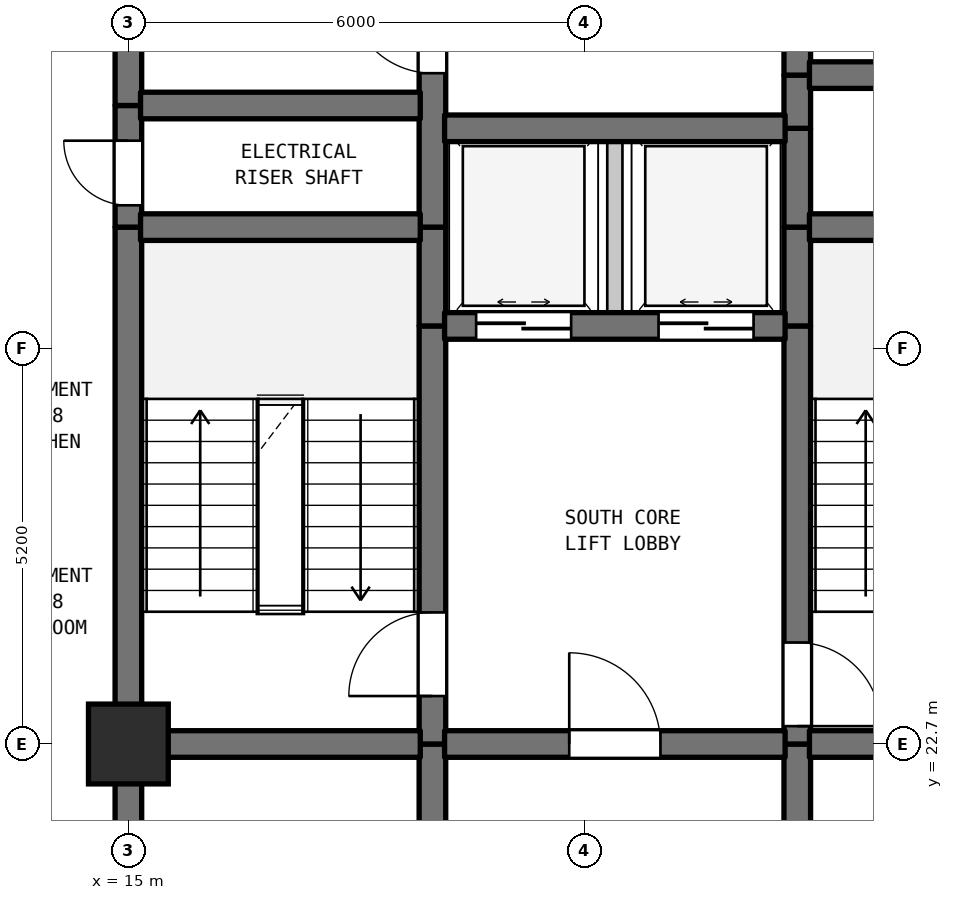
"""IFC4 building model, lengths in metres.
Left out: names, types, materials, properties, quantities, classifications, styles, units other than length and angle.
Written with IfcOpenShell. Run it as: python <this file> out.ifc"""

import sys

from ifc_helpers import new_model, si_unit, direction, frame, frame_2d, origin, origin_2d, place, context, subcontext, project, spatial, rectangle, extrude, element, fill, save


model = new_model("IFC4")
c1 = context("Model", 3, precision=1e-05, world=origin(), true_north=direction((0.0, 1.0)))
c2 = subcontext(c1, "Body", "Model", "MODEL_VIEW")
j1 = project(units=[si_unit("LENGTHUNIT", "METRE"), si_unit("PLANEANGLEUNIT", "RADIAN")], contexts=[c1])
p1 = place(None, origin())
s1 = spatial("IfcSite", under=j1, at=p1, CompositionType="ELEMENT")
p2 = place(p1, origin())
s2 = spatial("IfcBuilding", under=s1, at=p2, CompositionType="ELEMENT")
p3 = place(p2, frame((0.0, 0.0, 109.4)))
s3 = spatial("IfcBuildingStorey", under=s2, at=p3, CompositionType="ELEMENT", Elevation=109.4)
p4 = place(p3, frame((15.0, 22.7, 0.0), z_axis=(0.0, 0.0, 1.0), x_axis=(1.0, 0.0, 0.0)))
e1 = element("IfcColumn", 1, at=p4, inside=s3, PredefinedType="COLUMN", context=c2, shape_type="SweptSolid", body=[
    extrude(rectangle(XDim=1.05, YDim=1.05, at=origin_2d()), origin(), (0.0, 0.0, 1.0), 3.7),
])
p5 = place(p3, frame((15.0, 19.5, 0.0), z_axis=(0.0, 0.0, 1.0), x_axis=(0.0, 1.0, 0.0)))
e2 = element("IfcWall", 2, at=p5, inside=s3, PredefinedType="SHEAR", context=c2, shape_type="SweptSolid", body=[
    extrude(rectangle(XDim=3.2, YDim=0.35, at=frame_2d((1.6, 0.0))), origin(), (0.0, 0.0, 1.0), 3.385),
])
p6 = place(p3, frame((15.0, 22.7, 0.0), z_axis=(0.0, 0.0, 1.0), x_axis=(0.0, 1.0, 0.0)))
e3 = element("IfcWall", 3, at=p6, inside=s3, PredefinedType="SHEAR", context=c2, shape_type="SweptSolid", body=[
    extrude(rectangle(XDim=6.8, YDim=0.35, at=frame_2d((3.4, 0.0))), origin(), (0.0, 0.0, 1.0), 3.385),
])
p7 = place(p3, frame((15.0, 29.5, 0.0), z_axis=(0.0, 0.0, 1.0), x_axis=(0.0, 1.0, 0.0)))
e4 = element("IfcWall", 4, at=p7, inside=s3, PredefinedType="SHEAR", context=c2, shape_type="SweptSolid", body=[
    extrude(rectangle(XDim=1.6, YDim=0.35, at=frame_2d((0.8, 0.0))), origin(), (0.0, 0.0, 1.0), 3.385),
])
p8 = place(p7, frame((0.287, 0.0, 0.0)))
e5 = element("IfcOpeningElement", 5, at=p8, cuts=e4, PredefinedType="OPENING", context=c2, shape_type="SweptSolid", body=[
    extrude(rectangle(XDim=0.85, YDim=2.1, at=frame_2d((0.425, 1.05))), frame((0.0, 0.185, 0.0), z_axis=(0.0, -1.0, 0.0), x_axis=(1.0, 0.0, 0.0)), (0.0, 0.0, 1.0), 0.37),
])
p9 = place(p3, frame((15.0, 31.1, 0.0), z_axis=(0.0, 0.0, 1.0), x_axis=(0.0, 1.0, 0.0)))
e6 = element("IfcWall", 6, at=p9, inside=s3, PredefinedType="SHEAR", context=c2, shape_type="SweptSolid", body=[
    extrude(rectangle(XDim=6.8, YDim=0.35, at=frame_2d((3.4, 0.0))), origin(), (0.0, 0.0, 1.0), 3.385),
])
p10 = place(p3, frame((19.0, 19.5, 0.0), z_axis=(0.0, 0.0, 1.0), x_axis=(0.0, 1.0, 0.0)))
e7 = element("IfcWall", 7, at=p10, inside=s3, PredefinedType="SHEAR", context=c2, shape_type="SweptSolid", body=[
    extrude(rectangle(XDim=3.2, YDim=0.35, at=frame_2d((1.6, 0.0))), origin(), (0.0, 0.0, 1.0), 3.385),
])
p11 = place(p3, frame((19.0, 22.7, 0.0), z_axis=(0.0, 0.0, 1.0), x_axis=(0.0, 1.0, 0.0)))
e8 = element("IfcWall", 8, at=p11, inside=s3, PredefinedType="SHEAR", context=c2, shape_type="SweptSolid", body=[
    extrude(rectangle(XDim=5.5, YDim=0.35, at=frame_2d((2.75, 0.0))), origin(), (0.0, 0.0, 1.0), 3.385),
])
p12 = place(p11, frame((0.631, 0.0, 0.0)))
e9 = element("IfcOpeningElement", 9, at=p12, cuts=e8, PredefinedType="OPENING", context=c2, shape_type="SweptSolid", body=[
    extrude(rectangle(XDim=1.1, YDim=2.15, at=frame_2d((0.55, 1.075))), frame((0.0, 0.185, 0.0), z_axis=(0.0, -1.0, 0.0), x_axis=(1.0, 0.0, 0.0)), (0.0, 0.0, 1.0), 0.37),
])
p13 = place(p3, frame((19.0, 28.2, 0.0), z_axis=(0.0, 0.0, 1.0), x_axis=(0.0, 1.0, 0.0)))
e10 = element("IfcWall", 10, at=p13, inside=s3, PredefinedType="SHEAR", context=c2, shape_type="SweptSolid", body=[
    extrude(rectangle(XDim=1.3, YDim=0.35, at=frame_2d((0.65, 0.0))), origin(), (0.0, 0.0, 1.0), 3.385),
])
p14 = place(p3, frame((19.0, 29.5, 0.0), z_axis=(0.0, 0.0, 1.0), x_axis=(0.0, 1.0, 0.0)))
e11 = element("IfcWall", 11, at=p14, inside=s3, PredefinedType="SHEAR", context=c2, shape_type="SweptSolid", body=[
    extrude(rectangle(XDim=5.5, YDim=0.35, at=frame_2d((2.75, 0.0))), origin(), (0.0, 0.0, 1.0), 3.385),
])
p15 = place(p14, frame((2.025, 0.0, 0.0)))
e12 = element("IfcOpeningElement", 12, at=p15, cuts=e11, PredefinedType="OPENING", context=c2, shape_type="SweptSolid", body=[
    extrude(rectangle(XDim=1.1, YDim=2.15, at=frame_2d((0.55, 1.075))), frame((0.0, 0.185, 0.0), z_axis=(0.0, -1.0, 0.0), x_axis=(1.0, 0.0, 0.0)), (0.0, 0.0, 1.0), 0.37),
])
p16 = place(p3, frame((21.4, 28.2, 0.0), z_axis=(0.0, 0.0, 1.0), x_axis=(0.0, 1.0, 0.0)))
e13 = element("IfcWall", 13, at=p16, inside=s3, PredefinedType="STANDARD", context=c2, shape_type="SweptSolid", body=[
    extrude(rectangle(XDim=2.6, YDim=0.2, at=frame_2d((1.3, 0.0))), origin(), (0.0, 0.0, 1.0), 3.385),
])
p17 = place(p3, frame((23.8, 19.5, 0.0), z_axis=(0.0, 0.0, 1.0), x_axis=(0.0, 1.0, 0.0)))
e14 = element("IfcWall", 14, at=p17, inside=s3, PredefinedType="SHEAR", context=c2, shape_type="SweptSolid", body=[
    extrude(rectangle(XDim=3.2, YDim=0.35, at=frame_2d((1.6, 0.0))), origin(), (0.0, 0.0, 1.0), 3.385),
])
p18 = place(p3, frame((23.8, 22.7, 0.0), z_axis=(0.0, 0.0, 1.0), x_axis=(0.0, 1.0, 0.0)))
e15 = element("IfcWall", 15, at=p18, inside=s3, PredefinedType="SHEAR", context=c2, shape_type="SweptSolid", body=[
    extrude(rectangle(XDim=5.5, YDim=0.35, at=frame_2d((2.75, 0.0))), origin(), (0.0, 0.0, 1.0), 3.385),
])
p19 = place(p18, frame((0.235, 0.0, 0.0)))
e16 = element("IfcOpeningElement", 16, at=p19, cuts=e15, PredefinedType="OPENING", context=c2, shape_type="SweptSolid", body=[
    extrude(rectangle(XDim=1.1, YDim=2.15, at=frame_2d((0.55, 1.075))), frame((0.0, 0.185, 0.0), z_axis=(0.0, -1.0, 0.0), x_axis=(1.0, 0.0, 0.0)), (0.0, 0.0, 1.0), 0.37),
])
for number, where, z_axis, x_axis in (
    (17, (23.8, 28.2, 0.0), (0.0, 0.0, 1.0), (0.0, 1.0, 0.0)),
    (18, (23.8, 29.5, 0.0), (0.0, 0.0, 1.0), (0.0, 1.0, 0.0)),
):
    element("IfcWall", number, at=place(p3, frame(where, z_axis=z_axis, x_axis=x_axis)), inside=s3, PredefinedType="SHEAR", context=c2, shape_type="SweptSolid", body=[
        extrude(rectangle(XDim=1.3, YDim=0.35, at=frame_2d((0.65, 0.0))), origin(), (0.0, 0.0, 1.0), 3.385),
    ])
p20 = place(p3, frame((23.8, 30.8, 0.0), z_axis=(0.0, 0.0, 1.0), x_axis=(0.0, 1.0, 0.0)))
e19 = element("IfcWall", 19, at=p20, inside=s3, PredefinedType="SHEAR", context=c2, shape_type="SweptSolid", body=[
    extrude(rectangle(XDim=0.7, YDim=0.35, at=frame_2d((0.35, 0.0))), origin(), (0.0, 0.0, 1.0), 3.385),
])
p21 = place(p3, frame((23.8, 31.5, 0.0), z_axis=(0.0, 0.0, 1.0), x_axis=(0.0, 1.0, 0.0)))
e20 = element("IfcWall", 20, at=p21, inside=s3, PredefinedType="SHEAR", context=c2, shape_type="SweptSolid", body=[
    extrude(rectangle(XDim=3.5, YDim=0.35, at=frame_2d((1.75, 0.0))), origin(), (0.0, 0.0, 1.0), 3.385),
])
p22 = place(p21, frame((1.127, 0.0, 0.0)))
e21 = element("IfcOpeningElement", 21, at=p22, cuts=e20, PredefinedType="OPENING", context=c2, shape_type="SweptSolid", body=[
    extrude(rectangle(XDim=1.1, YDim=2.15, at=frame_2d((0.55, 1.075))), frame((0.0, 0.185, 0.0), z_axis=(0.0, -1.0, 0.0), x_axis=(1.0, 0.0, 0.0)), (0.0, 0.0, 1.0), 0.37),
])
p23 = place(p3, frame((15.16, 22.7, 0.0), z_axis=(0.0, 0.0, 1.0), x_axis=(1.0, 0.0, 0.0)))
e22 = element("IfcWall", 22, at=p23, inside=s3, PredefinedType="SHEAR", context=c2, shape_type="SweptSolid", body=[
    extrude(rectangle(XDim=3.68, YDim=0.35, at=frame_2d((1.84, 0.0))), origin(), (0.0, 0.0, 1.0), 3.385),
])
p24 = place(p3, frame((19.16, 22.7, 0.0), z_axis=(0.0, 0.0, 1.0), x_axis=(1.0, 0.0, 0.0)))
e23 = element("IfcWall", 23, at=p24, inside=s3, PredefinedType="SHEAR", context=c2, shape_type="SweptSolid", body=[
    extrude(rectangle(XDim=4.48, YDim=0.35, at=frame_2d((2.24, 0.0))), origin(), (0.0, 0.0, 1.0), 3.385),
])
p25 = place(p24, frame((1.64, 0.0, 0.0)))
e24 = element("IfcOpeningElement", 24, at=p25, cuts=e23, PredefinedType="OPENING", context=c2, shape_type="SweptSolid", body=[
    extrude(rectangle(XDim=1.2, YDim=2.2, at=frame_2d((0.6, 1.1))), frame((0.0, 0.185, 0.0), z_axis=(0.0, -1.0, 0.0), x_axis=(1.0, 0.0, 0.0)), (0.0, 0.0, 1.0), 0.37),
])
p26 = place(p3, frame((23.96, 22.7, 0.0), z_axis=(0.0, 0.0, 1.0), x_axis=(1.0, 0.0, 0.0)))
e25 = element("IfcWall", 25, at=p26, inside=s3, PredefinedType="SHEAR", context=c2, shape_type="SweptSolid", body=[
    extrude(rectangle(XDim=3.18, YDim=0.35, at=frame_2d((1.59, 0.0))), origin(), (0.0, 0.0, 1.0), 3.385),
])
p27 = place(p3, frame((19.16, 28.2, 0.0), z_axis=(0.0, 0.0, 1.0), x_axis=(1.0, 0.0, 0.0)))
e26 = element("IfcWall", 26, at=p27, inside=s3, PredefinedType="SHEAR", context=c2, shape_type="SweptSolid", body=[
    extrude(rectangle(XDim=4.48, YDim=0.35, at=frame_2d((2.24, 0.0))), origin(), (0.0, 0.0, 1.0), 3.385),
])
p28 = place(p27, frame((0.415, 0.0, 0.0)))
e27 = element("IfcOpeningElement", 27, at=p28, cuts=e26, PredefinedType="OPENING", context=c2, shape_type="SweptSolid", body=[
    extrude(rectangle(XDim=1.25, YDim=2.2, at=frame_2d((0.625, 1.1))), frame((0.0, 0.185, 0.0), z_axis=(0.0, -1.0, 0.0), x_axis=(1.0, 0.0, 0.0)), (0.0, 0.0, 1.0), 0.37),
])
p29 = place(p27, frame((2.815, 0.0, 0.0)))
e28 = element("IfcOpeningElement", 28, at=p29, cuts=e26, PredefinedType="OPENING", context=c2, shape_type="SweptSolid", body=[
    extrude(rectangle(XDim=1.25, YDim=2.2, at=frame_2d((0.625, 1.1))), frame((0.0, 0.185, 0.0), z_axis=(0.0, -1.0, 0.0), x_axis=(1.0, 0.0, 0.0)), (0.0, 0.0, 1.0), 0.37),
])
p30 = place(p3, frame((15.16, 29.5, 0.0), z_axis=(0.0, 0.0, 1.0), x_axis=(1.0, 0.0, 0.0)))
e29 = element("IfcWall", 29, at=p30, inside=s3, PredefinedType="SHEAR", context=c2, shape_type="SweptSolid", body=[
    extrude(rectangle(XDim=3.68, YDim=0.35, at=frame_2d((1.84, 0.0))), origin(), (0.0, 0.0, 1.0), 3.385),
])
p31 = place(p3, frame((23.96, 29.5, 0.0), z_axis=(0.0, 0.0, 1.0), x_axis=(1.0, 0.0, 0.0)))
e30 = element("IfcWall", 30, at=p31, inside=s3, PredefinedType="SHEAR", context=c2, shape_type="SweptSolid", body=[
    extrude(rectangle(XDim=3.18, YDim=0.35, at=frame_2d((1.59, 0.0))), origin(), (0.0, 0.0, 1.0), 3.385),
])
p32 = place(p3, frame((19.16, 30.8, 0.0), z_axis=(0.0, 0.0, 1.0), x_axis=(1.0, 0.0, 0.0)))
e31 = element("IfcWall", 31, at=p32, inside=s3, PredefinedType="SHEAR", context=c2, shape_type="SweptSolid", body=[
    extrude(rectangle(XDim=4.48, YDim=0.35, at=frame_2d((2.24, 0.0))), origin(), (0.0, 0.0, 1.0), 3.385),
])
p33 = place(p3, frame((15.16, 31.1, 0.0), z_axis=(0.0, 0.0, 1.0), x_axis=(1.0, 0.0, 0.0)))
e32 = element("IfcWall", 32, at=p33, inside=s3, PredefinedType="SHEAR", context=c2, shape_type="SweptSolid", body=[
    extrude(rectangle(XDim=3.68, YDim=0.35, at=frame_2d((1.84, 0.0))), origin(), (0.0, 0.0, 1.0), 3.385),
])
p34 = place(p3, frame((23.96, 31.5, 0.0), z_axis=(0.0, 0.0, 1.0), x_axis=(1.0, 0.0, 0.0)))
e33 = element("IfcWall", 33, at=p34, inside=s3, PredefinedType="SHEAR", context=c2, shape_type="SweptSolid", body=[
    extrude(rectangle(XDim=3.18, YDim=0.35, at=frame_2d((1.59, 0.0))), origin(), (0.0, 0.0, 1.0), 3.385),
])
p35 = place(p34, frame((1.094, 0.0, 0.0)))
e34 = element("IfcOpeningElement", 34, at=p35, cuts=e33, PredefinedType="OPENING", context=c2, shape_type="SweptSolid", body=[
    extrude(rectangle(XDim=0.85, YDim=2.1, at=frame_2d((0.425, 1.05))), frame((0.0, 0.185, 0.0), z_axis=(0.0, -1.0, 0.0), x_axis=(1.0, 0.0, 0.0)), (0.0, 0.0, 1.0), 0.37),
])
p36 = place(p8, origin())
e35 = element("IfcDoor", 35, at=p36, inside=s3, OperationType="SINGLE_SWING_RIGHT", PredefinedType="DOOR", context=c2, shape_type="SweptSolid", body=[
    extrude(rectangle(XDim=0.85, YDim=2.1, at=frame_2d((0.425, 1.05))), frame((0.0, 0.025, 0.0), z_axis=(0.0, -1.0, 0.0), x_axis=(1.0, 0.0, 0.0)), (0.0, 0.0, 1.0), 0.05),
])
fill(e5, e35)
p37 = place(p12, origin())
e36 = element("IfcDoor", 36, at=p37, inside=s3, OperationType="SINGLE_SWING_LEFT", PredefinedType="DOOR", context=c2, shape_type="SweptSolid", body=[
    extrude(rectangle(XDim=1.1, YDim=2.15, at=frame_2d((0.55, 1.075))), frame((0.0, 0.025, 0.0), z_axis=(0.0, -1.0, 0.0), x_axis=(1.0, 0.0, 0.0)), (0.0, 0.0, 1.0), 0.05),
])
fill(e9, e36)
p38 = place(p15, origin())
e37 = element("IfcDoor", 37, at=p38, inside=s3, OperationType="SINGLE_SWING_RIGHT", PredefinedType="DOOR", context=c2, shape_type="SweptSolid", body=[
    extrude(rectangle(XDim=1.1, YDim=2.15, at=frame_2d((0.55, 1.075))), frame((0.0, 0.025, 0.0), z_axis=(0.0, -1.0, 0.0), x_axis=(1.0, 0.0, 0.0)), (0.0, 0.0, 1.0), 0.05),
])
fill(e12, e37)
p39 = place(p19, frame((1.1, 0.0, 0.0), z_axis=(0.0, 0.0, 1.0), x_axis=(-1.0, 0.0, 0.0)))
e38 = element("IfcDoor", 38, at=p39, inside=s3, OperationType="SINGLE_SWING_LEFT", PredefinedType="DOOR", context=c2, shape_type="SweptSolid", body=[
    extrude(rectangle(XDim=1.1, YDim=2.15, at=frame_2d((0.55, 1.075))), frame((0.0, 0.025, 0.0), z_axis=(0.0, -1.0, 0.0), x_axis=(1.0, 0.0, 0.0)), (0.0, 0.0, 1.0), 0.05),
])
fill(e16, e38)
p40 = place(p25, origin())
e39 = element("IfcDoor", 39, at=p40, inside=s3, OperationType="SINGLE_SWING_LEFT", PredefinedType="DOOR", context=c2, shape_type="SweptSolid", body=[
    extrude(rectangle(XDim=1.2, YDim=2.2, at=frame_2d((0.6, 1.1))), frame((0.0, 0.025, 0.0), z_axis=(0.0, -1.0, 0.0), x_axis=(1.0, 0.0, 0.0)), (0.0, 0.0, 1.0), 0.05),
])
fill(e24, e39)
p41 = place(p28, origin())
e40 = element("IfcDoor", 40, at=p41, inside=s3, OperationType="DOUBLE_DOOR_SLIDING", PredefinedType="DOOR", context=c2, shape_type="SweptSolid", body=[
    extrude(rectangle(XDim=1.25, YDim=2.2, at=frame_2d((0.625, 1.1))), frame((0.0, 0.025, 0.0), z_axis=(0.0, -1.0, 0.0), x_axis=(1.0, 0.0, 0.0)), (0.0, 0.0, 1.0), 0.05),
])
fill(e27, e40)
p42 = place(p29, origin())
e41 = element("IfcDoor", 41, at=p42, inside=s3, OperationType="DOUBLE_DOOR_SLIDING", PredefinedType="DOOR", context=c2, shape_type="SweptSolid", body=[
    extrude(rectangle(XDim=1.25, YDim=2.2, at=frame_2d((0.625, 1.1))), frame((0.0, 0.025, 0.0), z_axis=(0.0, -1.0, 0.0), x_axis=(1.0, 0.0, 0.0)), (0.0, 0.0, 1.0), 0.05),
])
fill(e28, e41)
save(model, sys.argv[1])
